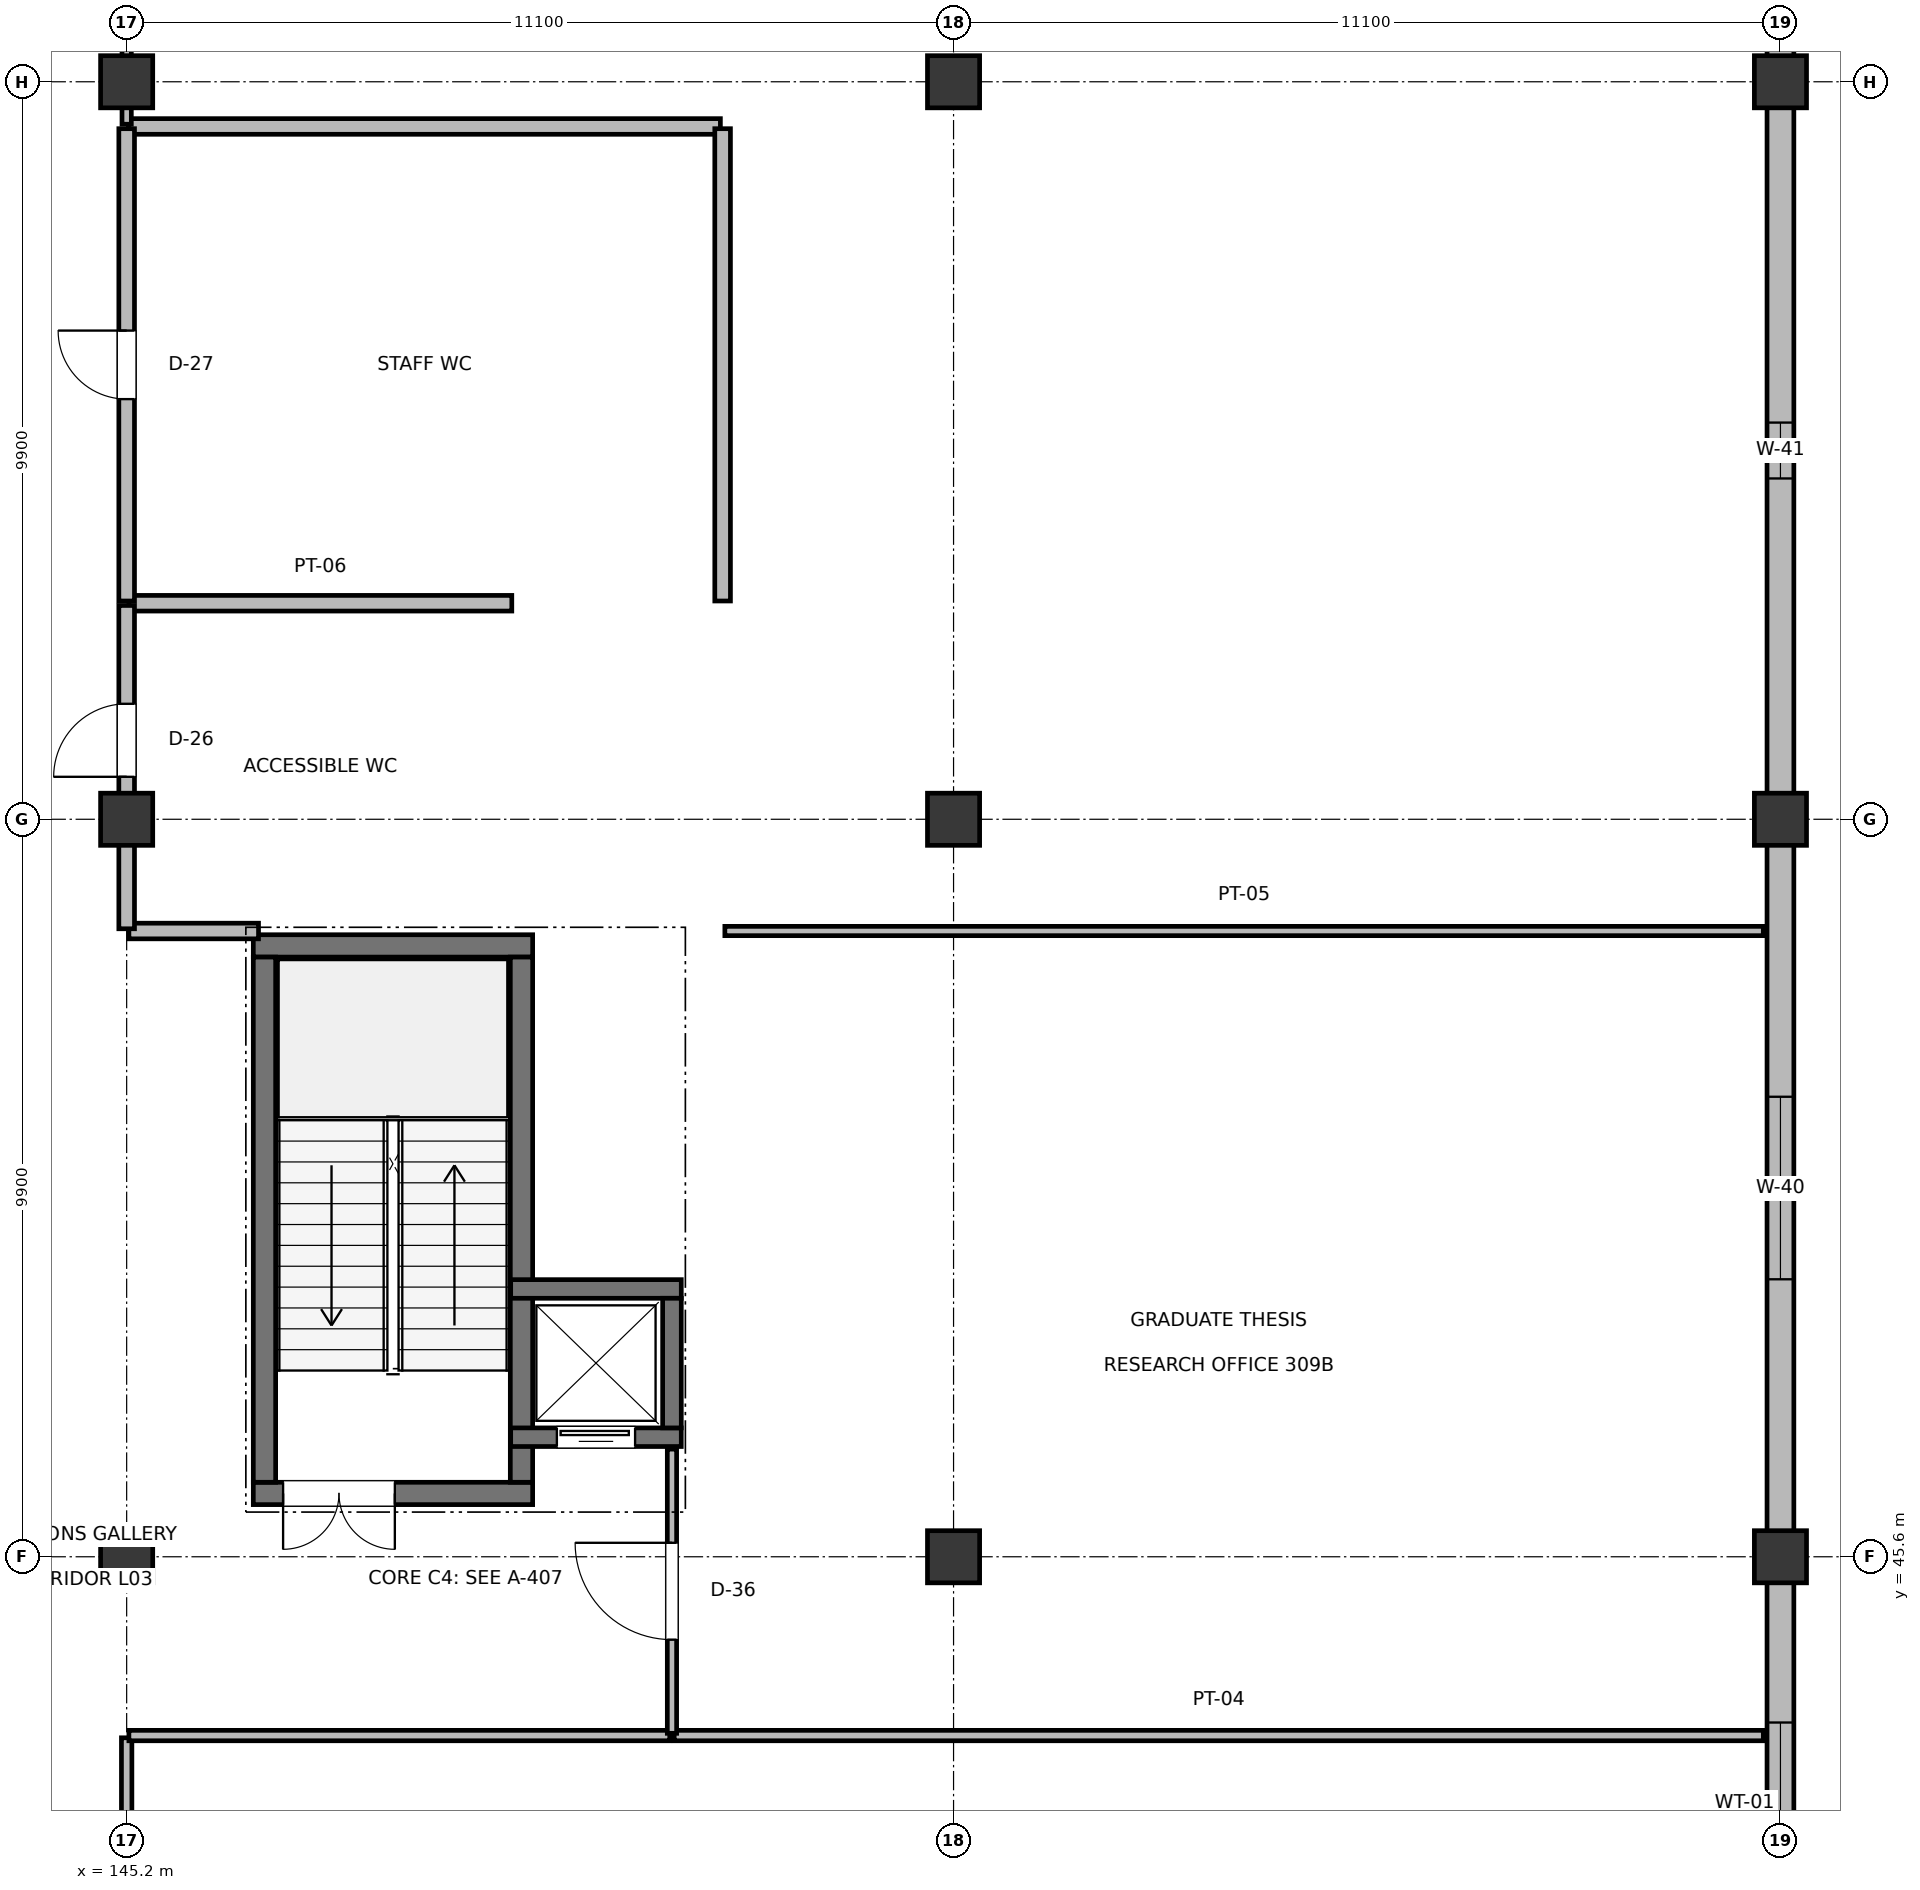
"""IFC4 building model, lengths in metres.
Left out: names, types, materials, properties, quantities, classifications, styles, units other than length and angle.
Written with IfcOpenShell. Run it as: python <this file> out.ifc"""

import sys

from ifc_helpers import new_model, si_unit, direction, frame, frame_2d, origin, origin_2d, place, context, subcontext, project, spatial, rectangle, extrude, element, fill, save


model = new_model("IFC4")
c1 = context("Model", 3, precision=1e-05, world=origin(), true_north=direction((0.0, 1.0)))
c2 = subcontext(c1, "Body", "Model", "MODEL_VIEW")
j1 = project(units=[si_unit("LENGTHUNIT", "METRE"), si_unit("PLANEANGLEUNIT", "RADIAN")], contexts=[c1])
p1 = place(None, origin())
s1 = spatial("IfcSite", under=j1, at=p1, CompositionType="ELEMENT")
p2 = place(p1, origin())
s2 = spatial("IfcBuilding", under=s1, at=p2, CompositionType="ELEMENT")
p3 = place(p2, frame((0.0, 0.0, 15.0)))
s3 = spatial("IfcBuildingStorey", under=s2, at=p3, CompositionType="ELEMENT", Elevation=15.0)
for number, where, z_axis, x_axis in (
    (1, (145.2, 45.6, 0.0), (0.0, 0.0, 1.0), (1.0, 0.0, 0.0)),
    (2, (145.2, 55.5, 0.0), (0.0, 0.0, 1.0), (1.0, 0.0, 0.0)),
    (3, (145.2, 65.4, 0.0), (0.0, 0.0, 1.0), (1.0, 0.0, 0.0)),
    (4, (156.3, 45.6, 0.0), (0.0, 0.0, 1.0), (1.0, 0.0, 0.0)),
    (5, (156.3, 55.5, 0.0), (0.0, 0.0, 1.0), (1.0, 0.0, 0.0)),
    (6, (156.3, 65.4, 0.0), (0.0, 0.0, 1.0), (1.0, 0.0, 0.0)),
    (7, (167.4, 45.6, 0.0), (0.0, 0.0, 1.0), (1.0, 0.0, 0.0)),
    (8, (167.4, 55.5, 0.0), (0.0, 0.0, 1.0), (1.0, 0.0, 0.0)),
    (9, (167.4, 65.4, 0.0), (0.0, 0.0, 1.0), (1.0, 0.0, 0.0)),
):
    element("IfcColumn", number, at=place(p3, frame(where, z_axis=z_axis, x_axis=x_axis)), inside=s3, PredefinedType="COLUMN", context=c2, shape_type="SweptSolid", body=[
        extrude(rectangle(XDim=0.7, YDim=0.7, at=origin_2d()), origin(), (0.0, 0.0, 1.0), 4.5),
    ])
p4 = place(p3, frame((167.4, 39.335, 0.0), z_axis=(0.0, 0.0, 1.0), x_axis=(0.0, 1.0, 0.0)))
e10 = element("IfcWall", 10, at=p4, inside=s3, PredefinedType="SOLIDWALL", context=c2, shape_type="SweptSolid", body=[
    extrude(rectangle(XDim=5.93, YDim=0.36, at=frame_2d((2.965, 0.0))), origin(), (0.0, 0.0, 1.0), 3.945),
])
p5 = place(p4, frame((1.89, 0.0, 0.85)))
e11 = element("IfcOpeningElement", 11, at=p5, cuts=e10, PredefinedType="OPENING", context=c2, shape_type="SweptSolid", body=[
    extrude(rectangle(XDim=2.15, YDim=1.7, at=frame_2d((1.075, 0.85))), frame((0.0, 0.19, 0.0), z_axis=(0.0, -1.0, 0.0), x_axis=(1.0, 0.0, 0.0)), (0.0, 0.0, 1.0), 0.38),
])
p6 = place(p3, frame((167.4, 45.935, 0.0), z_axis=(0.0, 0.0, 1.0), x_axis=(0.0, 1.0, 0.0)))
e12 = element("IfcWall", 12, at=p6, inside=s3, PredefinedType="SOLIDWALL", context=c2, shape_type="SweptSolid", body=[
    extrude(rectangle(XDim=9.23, YDim=0.36, at=frame_2d((4.615, 0.0))), origin(), (0.0, 0.0, 1.0), 3.945),
])
p7 = place(p6, frame((3.39, 0.0, 0.85)))
e13 = element("IfcOpeningElement", 13, at=p7, cuts=e12, PredefinedType="OPENING", context=c2, shape_type="SweptSolid", body=[
    extrude(rectangle(XDim=2.45, YDim=1.8, at=frame_2d((1.225, 0.9))), frame((0.0, 0.19, 0.0), z_axis=(0.0, -1.0, 0.0), x_axis=(1.0, 0.0, 0.0)), (0.0, 0.0, 1.0), 0.38),
])
p8 = place(p3, frame((167.4, 55.835, 0.0), z_axis=(0.0, 0.0, 1.0), x_axis=(0.0, 1.0, 0.0)))
e14 = element("IfcWall", 14, at=p8, inside=s3, PredefinedType="SOLIDWALL", context=c2, shape_type="SweptSolid", body=[
    extrude(rectangle(XDim=9.23, YDim=0.36, at=frame_2d((4.615, 0.0))), origin(), (0.0, 0.0, 1.0), 3.945),
])
p9 = place(p8, frame((4.24, 0.0, 0.85)))
e15 = element("IfcOpeningElement", 15, at=p9, cuts=e14, PredefinedType="OPENING", context=c2, shape_type="SweptSolid", body=[
    extrude(rectangle(XDim=0.75, YDim=1.15, at=frame_2d((0.375, 0.575))), frame((0.0, 0.19, 0.0), z_axis=(0.0, -1.0, 0.0), x_axis=(1.0, 0.0, 0.0)), (0.0, 0.0, 1.0), 0.38),
])
p10 = place(p3, frame((167.4, 65.735, 0.0), z_axis=(0.0, 0.0, 1.0), x_axis=(0.0, 1.0, 0.0)))
e16 = element("IfcWall", 16, at=p10, inside=s3, PredefinedType="SOLIDWALL", context=c2, shape_type="SweptSolid", body=[
    extrude(rectangle(XDim=10.13, YDim=0.36, at=frame_2d((5.065, 0.0))), origin(), (0.0, 0.0, 1.0), 3.945),
])
p11 = place(p10, frame((4.69, 0.0, 0.85)))
e17 = element("IfcOpeningElement", 17, at=p11, cuts=e16, PredefinedType="OPENING", context=c2, shape_type="SweptSolid", body=[
    extrude(rectangle(XDim=0.75, YDim=1.35, at=frame_2d((0.375, 0.675))), frame((0.0, 0.19, 0.0), z_axis=(0.0, -1.0, 0.0), x_axis=(1.0, 0.0, 0.0)), (0.0, 0.0, 1.0), 0.38),
])
p12 = place(p3, frame((146.9, 46.45, 0.0), z_axis=(0.0, 0.0, 1.0), x_axis=(1.0, 0.0, 0.0)))
e18 = element("IfcWall", 18, at=p12, inside=s3, PredefinedType="SHEAR", context=c2, shape_type="SweptSolid", body=[
    extrude(rectangle(XDim=3.75, YDim=0.3, at=frame_2d((1.875, 0.0))), origin(), (0.0, 0.0, 1.0), 4.28),
])
p13 = place(p12, frame((0.4, 0.0, 0.0)))
e19 = element("IfcOpeningElement", 19, at=p13, cuts=e18, PredefinedType="OPENING", context=c2, shape_type="SweptSolid", body=[
    extrude(rectangle(XDim=1.5, YDim=2.2, at=frame_2d((0.75, 1.1))), frame((0.0, 0.16, 0.0), z_axis=(0.0, -1.0, 0.0), x_axis=(1.0, 0.0, 0.0)), (0.0, 0.0, 1.0), 0.32),
])
p14 = place(p3, frame((146.9, 53.8, 0.0), z_axis=(0.0, 0.0, 1.0), x_axis=(1.0, 0.0, 0.0)))
e20 = element("IfcWall", 20, at=p14, inside=s3, PredefinedType="SHEAR", context=c2, shape_type="SweptSolid", body=[
    extrude(rectangle(XDim=3.75, YDim=0.3, at=frame_2d((1.875, 0.0))), origin(), (0.0, 0.0, 1.0), 4.28),
])
for number, where, z_axis, x_axis in (
    (21, (147.05, 46.6, 0.0), (0.0, 0.0, 1.0), (0.0, 1.0, 0.0)),
    (22, (150.5, 46.6, 0.0), (0.0, 0.0, 1.0), (0.0, 1.0, 0.0)),
):
    element("IfcWall", number, at=place(p3, frame(where, z_axis=z_axis, x_axis=x_axis)), inside=s3, PredefinedType="SHEAR", context=c2, shape_type="SweptSolid", body=[
        extrude(rectangle(XDim=7.05, YDim=0.3, at=frame_2d((3.525, 0.0))), origin(), (0.0, 0.0, 1.0), 4.28),
    ])
p15 = place(p3, frame((150.355, 47.205, 0.0), z_axis=(0.0, 0.0, 1.0), x_axis=(1.0, 0.0, 0.0)))
e23 = element("IfcWall", 23, at=p15, inside=s3, PredefinedType="SHEAR", context=c2, shape_type="SweptSolid", body=[
    extrude(rectangle(XDim=2.29, YDim=0.25, at=frame_2d((1.145, 0.0))), origin(), (0.0, 0.0, 1.0), 4.26),
])
p16 = place(p15, frame((0.62, 0.0, 0.0)))
e24 = element("IfcOpeningElement", 24, at=p16, cuts=e23, PredefinedType="OPENING", context=c2, shape_type="SweptSolid", body=[
    extrude(rectangle(XDim=1.05, YDim=2.15, at=frame_2d((0.525, 1.075))), frame((0.0, 0.135, 0.0), z_axis=(0.0, -1.0, 0.0), x_axis=(1.0, 0.0, 0.0)), (0.0, 0.0, 1.0), 0.27),
])
p17 = place(p3, frame((150.355, 49.195, 0.0), z_axis=(0.0, 0.0, 1.0), x_axis=(1.0, 0.0, 0.0)))
e25 = element("IfcWall", 25, at=p17, inside=s3, PredefinedType="SHEAR", context=c2, shape_type="SweptSolid", body=[
    extrude(rectangle(XDim=2.29, YDim=0.25, at=frame_2d((1.145, 0.0))), origin(), (0.0, 0.0, 1.0), 4.26),
])
p18 = place(p3, frame((152.52, 47.33, 0.0), z_axis=(0.0, 0.0, 1.0), x_axis=(0.0, 1.0, 0.0)))
e26 = element("IfcWall", 26, at=p18, inside=s3, PredefinedType="SHEAR", context=c2, shape_type="SweptSolid", body=[
    extrude(rectangle(XDim=1.74, YDim=0.25, at=frame_2d((0.87, 0.0))), origin(), (0.0, 0.0, 1.0), 4.26),
])
p19 = place(p3, frame((152.55, 43.2, 0.0), z_axis=(0.0, 0.0, 1.0), x_axis=(1.0, 0.0, 0.0)))
e27 = element("IfcWall", 27, at=p19, inside=s3, PredefinedType="PARTITIONING", context=c2, shape_type="SweptSolid", body=[
    extrude(rectangle(XDim=14.62, YDim=0.14, at=frame_2d((7.31, 0.0))), origin(), (0.0, 0.0, 1.0), 3.555),
])
p20 = place(p3, frame((145.2, 12.23, 0.0), z_axis=(0.0, 0.0, 1.0), x_axis=(0.0, 1.0, 0.0)))
e28 = element("IfcWall", 28, at=p20, inside=s3, PredefinedType="PARTITIONING", context=c2, shape_type="SweptSolid", body=[
    extrude(rectangle(XDim=30.94, YDim=0.14, at=frame_2d((15.47, 0.0))), origin(), (0.0, 0.0, 1.0), 3.355),
])
p21 = place(p20, frame((14.93, 0.0, 0.0)))
e29 = element("IfcOpeningElement", 29, at=p21, cuts=e28, PredefinedType="OPENING", context=c2, shape_type="SweptSolid", body=[
    extrude(rectangle(XDim=1.08, YDim=2.15, at=frame_2d((0.54, 1.075))), frame((0.0, 0.08, 0.0), z_axis=(0.0, -1.0, 0.0), x_axis=(1.0, 0.0, 0.0)), (0.0, 0.0, 1.0), 0.16),
])
p22 = place(p3, frame((145.23, 43.2, 0.0), z_axis=(0.0, 0.0, 1.0), x_axis=(1.0, 0.0, 0.0)))
e30 = element("IfcWall", 30, at=p22, inside=s3, PredefinedType="PARTITIONING", context=c2, shape_type="SweptSolid", body=[
    extrude(rectangle(XDim=7.26, YDim=0.14, at=frame_2d((3.63, 0.0))), origin(), (0.0, 0.0, 1.0), 3.555),
])
p23 = place(p3, frame((153.23, 54.0, 0.0), z_axis=(0.0, 0.0, 1.0), x_axis=(1.0, 0.0, 0.0)))
e31 = element("IfcWall", 31, at=p23, inside=s3, PredefinedType="PARTITIONING", context=c2, shape_type="SweptSolid", body=[
    extrude(rectangle(XDim=13.94, YDim=0.125, at=frame_2d((6.97, 0.0))), origin(), (0.0, 0.0, 1.0), 3.355),
])
p24 = place(p3, frame((152.52, 43.23, 0.0), z_axis=(0.0, 0.0, 1.0), x_axis=(0.0, 1.0, 0.0)))
e32 = element("IfcWall", 32, at=p24, inside=s3, PredefinedType="PARTITIONING", context=c2, shape_type="SweptSolid", body=[
    extrude(rectangle(XDim=3.815, YDim=0.125, at=frame_2d((1.907, 0.0))), origin(), (0.0, 0.0, 1.0), 3.285),
])
p25 = place(p24, frame((1.258, 0.0, 0.0)))
e33 = element("IfcOpeningElement", 33, at=p25, cuts=e32, PredefinedType="OPENING", context=c2, shape_type="SweptSolid", body=[
    extrude(rectangle(XDim=1.3, YDim=2.2, at=frame_2d((0.65, 1.1))), frame((0.0, 0.073, 0.0), z_axis=(0.0, -1.0, 0.0), x_axis=(1.0, 0.0, 0.0)), (0.0, 0.0, 1.0), 0.145),
])
p26 = place(p3, frame((145.23, 58.4, 0.0), z_axis=(0.0, 0.0, 1.0), x_axis=(1.0, 0.0, 0.0)))
e34 = element("IfcWall", 34, at=p26, inside=s3, PredefinedType="PLUMBINGWALL", context=c2, shape_type="SweptSolid", body=[
    extrude(rectangle(XDim=5.14, YDim=0.21, at=frame_2d((2.57, 0.0))), origin(), (0.0, 0.0, 1.0), 3.355),
])
p27 = place(p3, frame((145.23, 54.0, 0.0), z_axis=(0.0, 0.0, 1.0), x_axis=(1.0, 0.0, 0.0)))
e35 = element("IfcWall", 35, at=p27, inside=s3, PredefinedType="PLUMBINGWALL", context=c2, shape_type="SweptSolid", body=[
    extrude(rectangle(XDim=1.74, YDim=0.21, at=frame_2d((0.87, 0.0))), origin(), (0.0, 0.0, 1.0), 3.355),
])
p28 = place(p3, frame((145.2, 54.03, 0.0), z_axis=(0.0, 0.0, 1.0), x_axis=(0.0, 1.0, 0.0)))
e36 = element("IfcWall", 36, at=p28, inside=s3, PredefinedType="PLUMBINGWALL", context=c2, shape_type="SweptSolid", body=[
    extrude(rectangle(XDim=4.34, YDim=0.21, at=frame_2d((2.17, 0.0))), origin(), (0.0, 0.0, 1.0), 3.355),
])
p29 = place(p28, frame((2.04, 0.0, 0.0)))
e37 = element("IfcOpeningElement", 37, at=p29, cuts=e36, PredefinedType="OPENING", context=c2, shape_type="SweptSolid", body=[
    extrude(rectangle(XDim=0.98, YDim=2.1, at=frame_2d((0.49, 1.05))), frame((0.0, 0.115, 0.0), z_axis=(0.0, -1.0, 0.0), x_axis=(1.0, 0.0, 0.0)), (0.0, 0.0, 1.0), 0.23),
])
p30 = place(p3, frame((145.23, 64.8, 0.0), z_axis=(0.0, 0.0, 1.0), x_axis=(1.0, 0.0, 0.0)))
e38 = element("IfcWall", 38, at=p30, inside=s3, PredefinedType="PLUMBINGWALL", context=c2, shape_type="SweptSolid", body=[
    extrude(rectangle(XDim=7.94, YDim=0.21, at=frame_2d((3.97, 0.0))), origin(), (0.0, 0.0, 1.0), 3.355),
])
p31 = place(p3, frame((153.2, 58.43, 0.0), z_axis=(0.0, 0.0, 1.0), x_axis=(0.0, 1.0, 0.0)))
e39 = element("IfcWall", 39, at=p31, inside=s3, PredefinedType="PLUMBINGWALL", context=c2, shape_type="SweptSolid", body=[
    extrude(rectangle(XDim=6.34, YDim=0.21, at=frame_2d((3.17, 0.0))), origin(), (0.0, 0.0, 1.0), 4.18),
])
p32 = place(p3, frame((145.2, 58.43, 0.0), z_axis=(0.0, 0.0, 1.0), x_axis=(0.0, 1.0, 0.0)))
e40 = element("IfcWall", 40, at=p32, inside=s3, PredefinedType="PLUMBINGWALL", context=c2, shape_type="SweptSolid", body=[
    extrude(rectangle(XDim=6.34, YDim=0.21, at=frame_2d((3.17, 0.0))), origin(), (0.0, 0.0, 1.0), 3.355),
])
p33 = place(p32, frame((2.71, 0.0, 0.0)))
e41 = element("IfcOpeningElement", 41, at=p33, cuts=e40, PredefinedType="OPENING", context=c2, shape_type="SweptSolid", body=[
    extrude(rectangle(XDim=0.92, YDim=2.1, at=frame_2d((0.46, 1.05))), frame((0.0, 0.115, 0.0), z_axis=(0.0, -1.0, 0.0), x_axis=(1.0, 0.0, 0.0)), (0.0, 0.0, 1.0), 0.23),
])
p34 = place(p3, frame((145.2, 64.83, 0.0), z_axis=(0.0, 0.0, 1.0), x_axis=(0.0, 1.0, 0.0)))
e42 = element("IfcWall", 42, at=p34, inside=s3, PredefinedType="PARTITIONING", context=c2, shape_type="SweptSolid", body=[
    extrude(rectangle(XDim=11.14, YDim=0.125, at=frame_2d((5.57, 0.0))), origin(), (0.0, 0.0, 1.0), 3.355),
])
p35 = place(p34, frame((5.07, 0.0, 0.0)))
e43 = element("IfcOpeningElement", 43, at=p35, cuts=e42, PredefinedType="OPENING", context=c2, shape_type="SweptSolid", body=[
    extrude(rectangle(XDim=1.0, YDim=2.15, at=frame_2d((0.5, 1.075))), frame((0.0, 0.073, 0.0), z_axis=(0.0, -1.0, 0.0), x_axis=(1.0, 0.0, 0.0)), (0.0, 0.0, 1.0), 0.145),
])
p36 = place(p5, frame((2.15, 0.0, 0.0), z_axis=(0.0, 0.0, 1.0), x_axis=(-1.0, 0.0, 0.0)))
e44 = element("IfcWindow", 44, at=p36, inside=s3, PartitioningType="DOUBLE_PANEL_VERTICAL", PredefinedType="WINDOW", context=c2, shape_type="SweptSolid", body=[
    extrude(rectangle(XDim=2.15, YDim=1.7, at=frame_2d((1.075, 0.85))), frame((0.0, 0.03, 0.0), z_axis=(0.0, -1.0, 0.0), x_axis=(1.0, 0.0, 0.0)), (0.0, 0.0, 1.0), 0.06),
])
fill(e11, e44)
p37 = place(p7, frame((2.45, 0.0, 0.0), z_axis=(0.0, 0.0, 1.0), x_axis=(-1.0, 0.0, 0.0)))
e45 = element("IfcWindow", 45, at=p37, inside=s3, PartitioningType="DOUBLE_PANEL_VERTICAL", PredefinedType="WINDOW", context=c2, shape_type="SweptSolid", body=[
    extrude(rectangle(XDim=2.45, YDim=1.8, at=frame_2d((1.225, 0.9))), frame((0.0, 0.03, 0.0), z_axis=(0.0, -1.0, 0.0), x_axis=(1.0, 0.0, 0.0)), (0.0, 0.0, 1.0), 0.06),
])
fill(e13, e45)
p38 = place(p9, frame((0.75, 0.0, 0.0), z_axis=(0.0, 0.0, 1.0), x_axis=(-1.0, 0.0, 0.0)))
e46 = element("IfcWindow", 46, at=p38, inside=s3, PartitioningType="DOUBLE_PANEL_VERTICAL", PredefinedType="WINDOW", context=c2, shape_type="SweptSolid", body=[
    extrude(rectangle(XDim=0.75, YDim=1.15, at=frame_2d((0.375, 0.575))), frame((0.0, 0.03, 0.0), z_axis=(0.0, -1.0, 0.0), x_axis=(1.0, 0.0, 0.0)), (0.0, 0.0, 1.0), 0.06),
])
fill(e15, e46)
p39 = place(p13, frame((1.5, 0.0, 0.0), z_axis=(0.0, 0.0, 1.0), x_axis=(-1.0, 0.0, 0.0)))
e47 = element("IfcDoor", 47, at=p39, inside=s3, OperationType="DOUBLE_DOOR_SINGLE_SWING", PredefinedType="DOOR", context=c2, shape_type="SweptSolid", body=[
    extrude(rectangle(XDim=1.5, YDim=2.2, at=frame_2d((0.75, 1.1))), frame((0.0, 0.025, 0.0), z_axis=(0.0, -1.0, 0.0), x_axis=(1.0, 0.0, 0.0)), (0.0, 0.0, 1.0), 0.05),
])
fill(e19, e47)
p40 = place(p16, frame((1.05, 0.0, 0.0), z_axis=(0.0, 0.0, 1.0), x_axis=(-1.0, 0.0, 0.0)))
e48 = element("IfcDoor", 48, at=p40, inside=s3, OperationType="SLIDING_TO_RIGHT", PredefinedType="DOOR", context=c2, shape_type="SweptSolid", body=[
    extrude(rectangle(XDim=1.05, YDim=2.15, at=frame_2d((0.525, 1.075))), frame((0.0, 0.025, 0.0), z_axis=(0.0, -1.0, 0.0), x_axis=(1.0, 0.0, 0.0)), (0.0, 0.0, 1.0), 0.05),
])
fill(e24, e48)
p41 = place(p25, origin())
e49 = element("IfcDoor", 49, at=p41, inside=s3, OperationType="SINGLE_SWING_RIGHT", PredefinedType="DOOR", context=c2, shape_type="SweptSolid", body=[
    extrude(rectangle(XDim=1.3, YDim=2.2, at=frame_2d((0.65, 1.1))), frame((0.0, 0.025, 0.0), z_axis=(0.0, -1.0, 0.0), x_axis=(1.0, 0.0, 0.0)), (0.0, 0.0, 1.0), 0.05),
])
fill(e33, e49)
p42 = place(p29, origin())
e50 = element("IfcDoor", 50, at=p42, inside=s3, OperationType="SINGLE_SWING_LEFT", PredefinedType="DOOR", context=c2, shape_type="SweptSolid", body=[
    extrude(rectangle(XDim=0.98, YDim=2.1, at=frame_2d((0.49, 1.05))), frame((0.0, 0.025, 0.0), z_axis=(0.0, -1.0, 0.0), x_axis=(1.0, 0.0, 0.0)), (0.0, 0.0, 1.0), 0.05),
])
fill(e37, e50)
p43 = place(p33, origin())
e51 = element("IfcDoor", 51, at=p43, inside=s3, OperationType="SINGLE_SWING_RIGHT", PredefinedType="DOOR", context=c2, shape_type="SweptSolid", body=[
    extrude(rectangle(XDim=0.92, YDim=2.1, at=frame_2d((0.46, 1.05))), frame((0.0, 0.025, 0.0), z_axis=(0.0, -1.0, 0.0), x_axis=(1.0, 0.0, 0.0)), (0.0, 0.0, 1.0), 0.05),
])
fill(e41, e51)
save(model, sys.argv[1])
